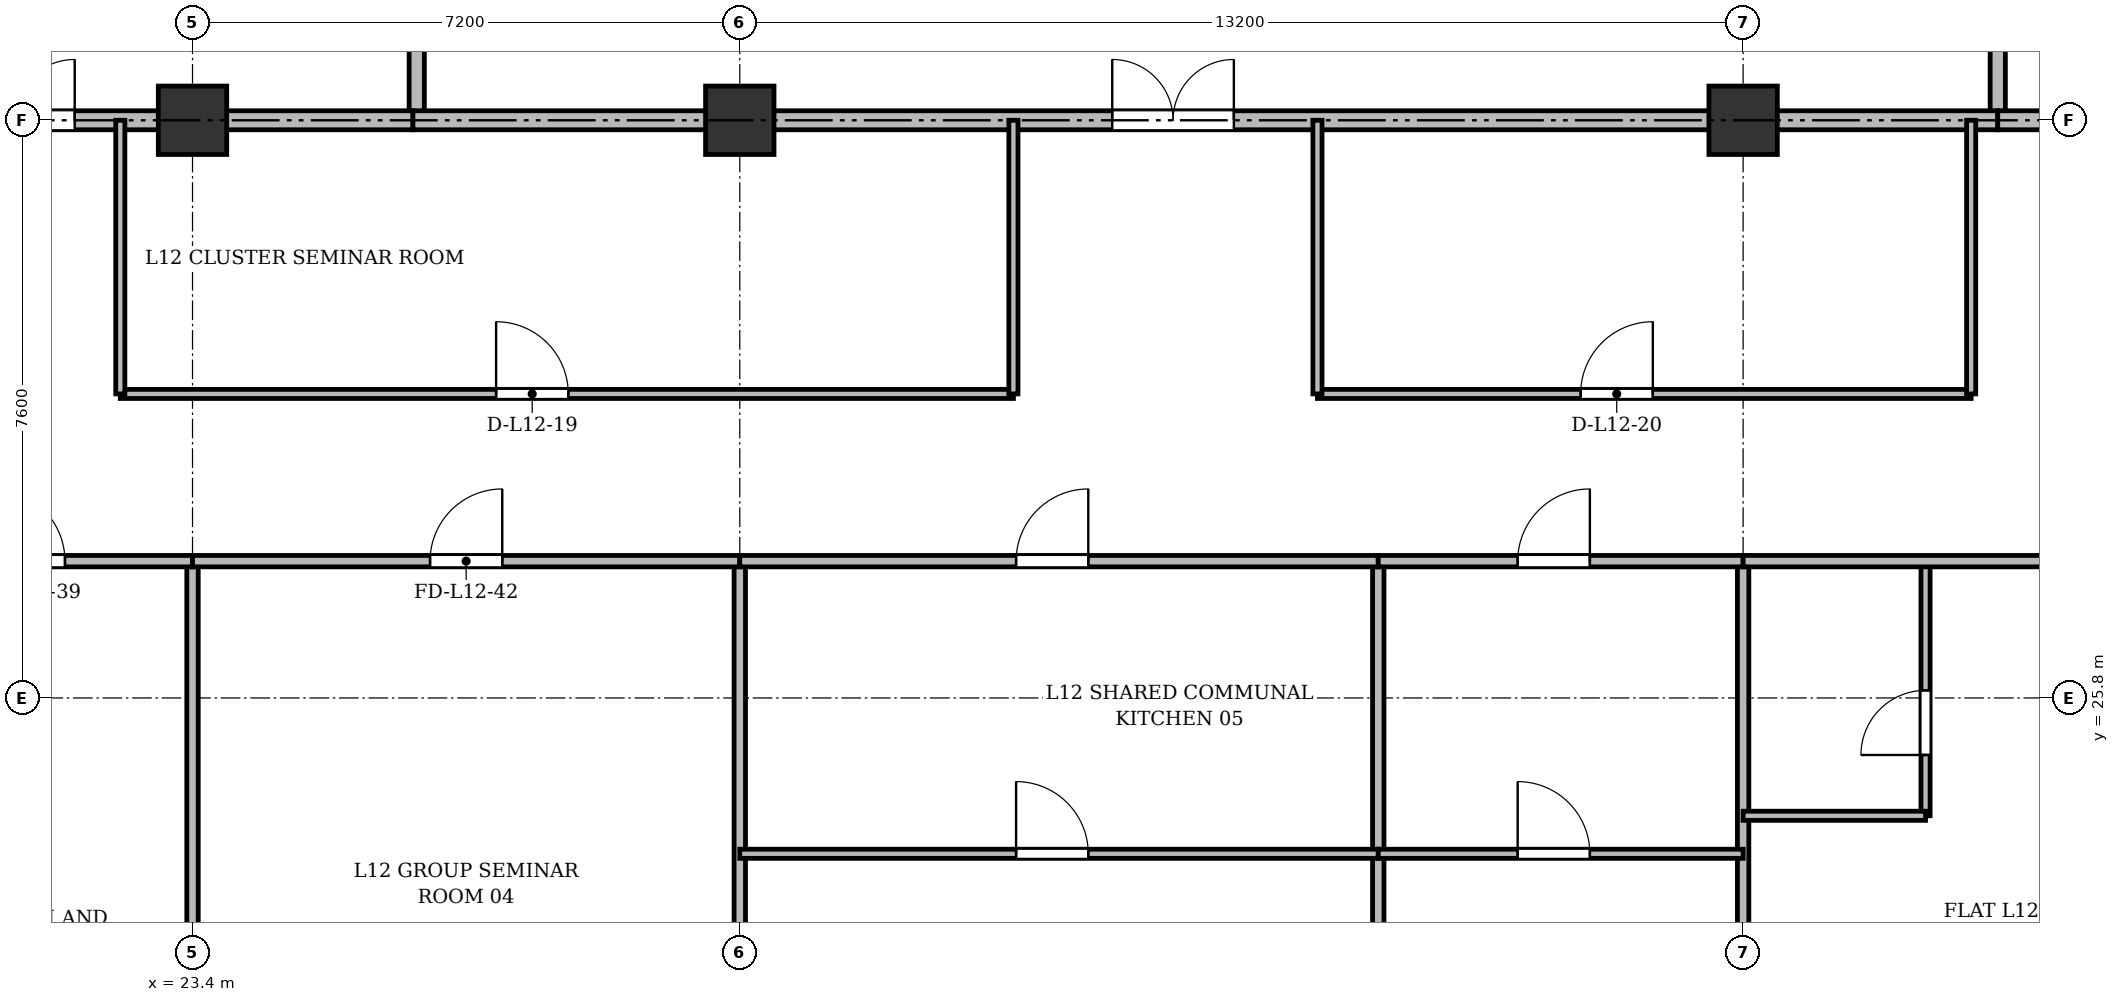
"""IFC4 building model, lengths in metres.
Left out: names, types, materials, properties, quantities, classifications, styles, units other than length and angle.
Written with IfcOpenShell. Run it as: python <this file> out.ifc"""

import sys

from ifc_helpers import new_model, si_unit, direction, frame, frame_2d, origin, origin_2d, place, context, subcontext, project, spatial, rectangle, extrude, source, transform, mapped, element, fill, save


model = new_model("IFC4")
c1 = context("Model", 3, precision=1e-05, world=origin(), true_north=direction((0.0, 1.0)))
c2 = subcontext(c1, "Body", "Model", "MODEL_VIEW")
j1 = project(units=[si_unit("LENGTHUNIT", "METRE"), si_unit("PLANEANGLEUNIT", "RADIAN")], contexts=[c1])
p1 = place(None, origin())
s1 = spatial("IfcSite", under=j1, at=p1, CompositionType="ELEMENT")
p2 = place(p1, origin())
s2 = spatial("IfcBuilding", under=s1, at=p2, CompositionType="ELEMENT")
p3 = place(p2, frame((0.0, 0.0, 48.7)))
s3 = spatial("IfcBuildingStorey", under=s2, at=p3, CompositionType="ELEMENT", Elevation=48.7)
m1 = source(origin(), c2, "Body", "SweptSolid", [
    extrude(rectangle(XDim=0.9, YDim=0.9, at=origin_2d()), origin(), (0.0, 0.0, 1.0), 3.6),
])
for number, where, z_axis, x_axis in (
    (1, (23.4, 33.4, 0.0), (0.0, 0.0, 1.0), (1.0, 0.0, 0.0)),
    (2, (30.6, 33.4, 0.0), (0.0, 0.0, 1.0), (1.0, 0.0, 0.0)),
    (3, (43.8, 33.4, 0.0), (0.0, 0.0, 1.0), (1.0, 0.0, 0.0)),
):
    element("IfcColumn", number, at=place(p3, frame(where, z_axis=z_axis, x_axis=x_axis)), inside=s3, PredefinedType="COLUMN", context=c2, shape_type="MappedRepresentation", body=[
        mapped(m1, transform((0.0, 0.0, 0.0), x_axis=(1.0, 0.0, 0.0), y_axis=(0.0, 1.0, 0.0), z_axis=(0.0, 0.0, 1.0), scale=1.0)),
    ])
p4 = place(p3, frame((26.35, 33.4, 0.0), z_axis=(0.0, 0.0, 1.0), x_axis=(0.0, 1.0, 0.0)))
e4 = element("IfcWall", 4, at=p4, inside=s3, PredefinedType="SOLIDWALL", context=c2, shape_type="SweptSolid", body=[
    extrude(rectangle(XDim=11.3, YDim=0.2, at=frame_2d((5.65, 0.0))), origin(), (0.0, 0.0, 1.0), 2.69),
])
p5 = place(p3, frame((19.5, 33.4, 0.0), z_axis=(0.0, 0.0, 1.0), x_axis=(1.0, 0.0, 0.0)))
e5 = element("IfcWall", 5, at=p5, inside=s3, PredefinedType="PARTITIONING", context=c2, shape_type="SweptSolid", body=[
    extrude(rectangle(XDim=6.8, YDim=0.25, at=frame_2d((3.4, 0.0))), origin(), (0.0, 0.0, 1.0), 2.69),
])
p6 = place(p5, frame((0.75, 0.0, 0.0)))
e6 = element("IfcOpeningElement", 6, at=p6, cuts=e5, PredefinedType="OPENING", context=c2, shape_type="SweptSolid", body=[
    extrude(rectangle(XDim=1.6, YDim=2.2, at=frame_2d((0.8, 1.1))), frame((0.0, 0.135, 0.0), z_axis=(0.0, -1.0, 0.0), x_axis=(1.0, 0.0, 0.0)), (0.0, 0.0, 1.0), 0.27),
])
p7 = place(p3, frame((47.15, 33.4, 0.0), z_axis=(0.0, 0.0, 1.0), x_axis=(0.0, 1.0, 0.0)))
e7 = element("IfcWall", 7, at=p7, inside=s3, PredefinedType="SOLIDWALL", context=c2, shape_type="SweptSolid", body=[
    extrude(rectangle(XDim=11.3, YDim=0.2, at=frame_2d((5.65, 0.0))), origin(), (0.0, 0.0, 1.0), 2.69),
])
p8 = place(p3, frame((26.3, 33.4, 0.0), z_axis=(0.0, 0.0, 1.0), x_axis=(1.0, 0.0, 0.0)))
e8 = element("IfcWall", 8, at=p8, inside=s3, PredefinedType="PARTITIONING", context=c2, shape_type="SweptSolid", body=[
    extrude(rectangle(XDim=20.85, YDim=0.25, at=frame_2d((10.425, 0.0))), origin(), (0.0, 0.0, 1.0), 2.69),
])
p9 = place(p8, frame((9.2, 0.0, 0.0)))
e9 = element("IfcOpeningElement", 9, at=p9, cuts=e8, PredefinedType="OPENING", context=c2, shape_type="SweptSolid", body=[
    extrude(rectangle(XDim=1.6, YDim=2.2, at=frame_2d((0.8, 1.1))), frame((0.0, 0.135, 0.0), z_axis=(0.0, -1.0, 0.0), x_axis=(1.0, 0.0, 0.0)), (0.0, 0.0, 1.0), 0.27),
])
p10 = place(p3, frame((47.15, 33.4, 0.0), z_axis=(0.0, 0.0, 1.0), x_axis=(1.0, 0.0, 0.0)))
e10 = element("IfcWall", 10, at=p10, inside=s3, PredefinedType="PARTITIONING", context=c2, shape_type="SweptSolid", body=[
    extrude(rectangle(XDim=11.15, YDim=0.25, at=frame_2d((5.575, 0.0))), origin(), (0.0, 0.0, 1.0), 2.69),
])
p11 = place(p10, frame((0.7, 0.0, 0.0)))
e11 = element("IfcOpeningElement", 11, at=p11, cuts=e10, PredefinedType="OPENING", context=c2, shape_type="SweptSolid", body=[
    extrude(rectangle(XDim=0.95, YDim=2.15, at=frame_2d((0.475, 1.075))), frame((0.0, 0.135, 0.0), z_axis=(0.0, -1.0, 0.0), x_axis=(1.0, 0.0, 0.0)), (0.0, 0.0, 1.0), 0.27),
])
p12 = place(p10, frame((6.0, 0.0, 0.0)))
e12 = element("IfcOpeningElement", 12, at=p12, cuts=e10, PredefinedType="OPENING", context=c2, shape_type="SweptSolid", body=[
    extrude(rectangle(XDim=1.2, YDim=2.15, at=frame_2d((0.6, 1.075))), frame((0.0, 0.135, 0.0), z_axis=(0.0, -1.0, 0.0), x_axis=(1.0, 0.0, 0.0)), (0.0, 0.0, 1.0), 0.27),
])
p13 = place(p3, frame((22.45, 29.8, 0.0), z_axis=(0.0, 0.0, 1.0), x_axis=(1.0, 0.0, 0.0)))
e13 = element("IfcWall", 13, at=p13, inside=s3, PredefinedType="PARTITIONING", context=c2, shape_type="SweptSolid", body=[
    extrude(rectangle(XDim=11.75, YDim=0.12, at=frame_2d((5.875, 0.0))), origin(), (0.0, 0.0, 1.0), 2.752),
])
p14 = place(p13, frame((4.944, 0.0, 0.0)))
e14 = element("IfcOpeningElement", 14, at=p14, cuts=e13, PredefinedType="OPENING", context=c2, shape_type="SweptSolid", body=[
    extrude(rectangle(XDim=0.95, YDim=2.15, at=frame_2d((0.475, 1.075))), frame((0.0, 0.07, 0.0), z_axis=(0.0, -1.0, 0.0), x_axis=(1.0, 0.0, 0.0)), (0.0, 0.0, 1.0), 0.14),
])
p15 = place(p3, frame((38.2, 29.8, 0.0), z_axis=(0.0, 0.0, 1.0), x_axis=(1.0, 0.0, 0.0)))
e15 = element("IfcWall", 15, at=p15, inside=s3, PredefinedType="PARTITIONING", context=c2, shape_type="SweptSolid", body=[
    extrude(rectangle(XDim=8.6, YDim=0.12, at=frame_2d((4.3, 0.0))), origin(), (0.0, 0.0, 1.0), 2.752),
])
p16 = place(p15, frame((3.462, 0.0, 0.0)))
e16 = element("IfcOpeningElement", 16, at=p16, cuts=e15, PredefinedType="OPENING", context=c2, shape_type="SweptSolid", body=[
    extrude(rectangle(XDim=0.95, YDim=2.15, at=frame_2d((0.475, 1.075))), frame((0.0, 0.07, 0.0), z_axis=(0.0, -1.0, 0.0), x_axis=(1.0, 0.0, 0.0)), (0.0, 0.0, 1.0), 0.14),
])
for number, where, z_axis, x_axis in (
    (17, (22.45, 29.8, 0.0), (0.0, 0.0, 1.0), (0.0, 1.0, 0.0)),
    (18, (34.2, 29.8, 0.0), (0.0, 0.0, 1.0), (0.0, 1.0, 0.0)),
    (19, (38.2, 29.8, 0.0), (0.0, 0.0, 1.0), (0.0, 1.0, 0.0)),
    (20, (46.8, 29.8, 0.0), (0.0, 0.0, 1.0), (0.0, 1.0, 0.0)),
):
    element("IfcWall", number, at=place(p3, frame(where, z_axis=z_axis, x_axis=x_axis)), inside=s3, PredefinedType="PARTITIONING", context=c2, shape_type="SweptSolid", body=[
        extrude(rectangle(XDim=3.6, YDim=0.12, at=frame_2d((1.8, 0.0))), origin(), (0.0, 0.0, 1.0), 2.69),
    ])
for number, where, z_axis, x_axis in (
    (21, (23.4, 3.145, 0.0), (0.0, 0.0, 1.0), (0.0, 1.0, 0.0)),
    (22, (30.6, 3.145, 0.0), (0.0, 0.0, 1.0), (0.0, 1.0, 0.0)),
):
    element("IfcWall", number, at=place(p3, frame(where, z_axis=z_axis, x_axis=x_axis)), inside=s3, PredefinedType="PARTITIONING", context=c2, shape_type="SweptSolid", body=[
        extrude(rectangle(XDim=24.455, YDim=0.15, at=frame_2d((12.228, 0.0))), origin(), (0.0, 0.0, 1.0), 2.752),
    ])
p17 = place(p3, frame((39.0, 3.145, 0.0), z_axis=(0.0, 0.0, 1.0), x_axis=(0.0, 1.0, 0.0)))
e23 = element("IfcWall", 23, at=p17, inside=s3, PredefinedType="PARTITIONING", context=c2, shape_type="SweptSolid", body=[
    extrude(rectangle(XDim=24.455, YDim=0.15, at=frame_2d((12.228, 0.0))), origin(), (0.0, 0.0, 1.0), 2.69),
])
p18 = place(p3, frame((43.8, 3.145, 0.0), z_axis=(0.0, 0.0, 1.0), x_axis=(0.0, 1.0, 0.0)))
e24 = element("IfcWall", 24, at=p18, inside=s3, PredefinedType="PARTITIONING", context=c2, shape_type="SweptSolid", body=[
    extrude(rectangle(XDim=24.455, YDim=0.15, at=frame_2d((12.228, 0.0))), origin(), (0.0, 0.0, 1.0), 2.752),
])
p19 = place(p3, frame((15.6, 27.6, 0.0), z_axis=(0.0, 0.0, 1.0), x_axis=(1.0, 0.0, 0.0)))
e25 = element("IfcWall", 25, at=p19, inside=s3, PredefinedType="PARTITIONING", context=c2, shape_type="SweptSolid", body=[
    extrude(rectangle(XDim=7.8, YDim=0.15, at=frame_2d((3.9, 0.0))), origin(), (0.0, 0.0, 1.0), 2.752),
])
p20 = place(p19, frame((5.172, 0.0, 0.0)))
e26 = element("IfcOpeningElement", 26, at=p20, cuts=e25, PredefinedType="OPENING", context=c2, shape_type="SweptSolid", body=[
    extrude(rectangle(XDim=0.95, YDim=2.15, at=frame_2d((0.475, 1.075))), frame((0.0, 0.085, 0.0), z_axis=(0.0, -1.0, 0.0), x_axis=(1.0, 0.0, 0.0)), (0.0, 0.0, 1.0), 0.17),
])
p21 = place(p3, frame((23.4, 27.6, 0.0), z_axis=(0.0, 0.0, 1.0), x_axis=(1.0, 0.0, 0.0)))
e27 = element("IfcWall", 27, at=p21, inside=s3, PredefinedType="PARTITIONING", context=c2, shape_type="SweptSolid", body=[
    extrude(rectangle(XDim=7.2, YDim=0.15, at=frame_2d((3.6, 0.0))), origin(), (0.0, 0.0, 1.0), 2.752),
])
p22 = place(p21, frame((3.125, 0.0, 0.0)))
e28 = element("IfcOpeningElement", 28, at=p22, cuts=e27, PredefinedType="OPENING", context=c2, shape_type="SweptSolid", body=[
    extrude(rectangle(XDim=0.95, YDim=2.15, at=frame_2d((0.475, 1.075))), frame((0.0, 0.085, 0.0), z_axis=(0.0, -1.0, 0.0), x_axis=(1.0, 0.0, 0.0)), (0.0, 0.0, 1.0), 0.17),
])
p23 = place(p3, frame((30.6, 27.6, 0.0), z_axis=(0.0, 0.0, 1.0), x_axis=(1.0, 0.0, 0.0)))
e29 = element("IfcWall", 29, at=p23, inside=s3, PredefinedType="PARTITIONING", context=c2, shape_type="SweptSolid", body=[
    extrude(rectangle(XDim=8.4, YDim=0.15, at=frame_2d((4.2, 0.0))), origin(), (0.0, 0.0, 1.0), 2.752),
])
p24 = place(p23, frame((3.635, 0.0, 0.0)))
e30 = element("IfcOpeningElement", 30, at=p24, cuts=e29, PredefinedType="OPENING", context=c2, shape_type="SweptSolid", body=[
    extrude(rectangle(XDim=0.95, YDim=2.15, at=frame_2d((0.475, 1.075))), frame((0.0, 0.085, 0.0), z_axis=(0.0, -1.0, 0.0), x_axis=(1.0, 0.0, 0.0)), (0.0, 0.0, 1.0), 0.17),
])
p25 = place(p3, frame((30.6, 23.75, 0.0), z_axis=(0.0, 0.0, 1.0), x_axis=(1.0, 0.0, 0.0)))
e31 = element("IfcWall", 31, at=p25, inside=s3, PredefinedType="PARTITIONING", context=c2, shape_type="SweptSolid", body=[
    extrude(rectangle(XDim=8.4, YDim=0.12, at=frame_2d((4.2, 0.0))), origin(), (0.0, 0.0, 1.0), 2.752),
])
p26 = place(p25, frame((3.635, 0.0, 0.0)))
e32 = element("IfcOpeningElement", 32, at=p26, cuts=e31, PredefinedType="OPENING", context=c2, shape_type="SweptSolid", body=[
    extrude(rectangle(XDim=0.95, YDim=2.15, at=frame_2d((0.475, 1.075))), frame((0.0, 0.07, 0.0), z_axis=(0.0, -1.0, 0.0), x_axis=(1.0, 0.0, 0.0)), (0.0, 0.0, 1.0), 0.14),
])
p27 = place(p3, frame((39.0, 27.6, 0.0), z_axis=(0.0, 0.0, 1.0), x_axis=(1.0, 0.0, 0.0)))
e33 = element("IfcWall", 33, at=p27, inside=s3, PredefinedType="PARTITIONING", context=c2, shape_type="SweptSolid", body=[
    extrude(rectangle(XDim=4.8, YDim=0.15, at=frame_2d((2.4, 0.0))), origin(), (0.0, 0.0, 1.0), 2.752),
])
p28 = place(p27, frame((1.834, 0.0, 0.0)))
e34 = element("IfcOpeningElement", 34, at=p28, cuts=e33, PredefinedType="OPENING", context=c2, shape_type="SweptSolid", body=[
    extrude(rectangle(XDim=0.95, YDim=2.15, at=frame_2d((0.475, 1.075))), frame((0.0, 0.085, 0.0), z_axis=(0.0, -1.0, 0.0), x_axis=(1.0, 0.0, 0.0)), (0.0, 0.0, 1.0), 0.17),
])
p29 = place(p3, frame((39.0, 23.75, 0.0), z_axis=(0.0, 0.0, 1.0), x_axis=(1.0, 0.0, 0.0)))
e35 = element("IfcWall", 35, at=p29, inside=s3, PredefinedType="PARTITIONING", context=c2, shape_type="SweptSolid", body=[
    extrude(rectangle(XDim=4.8, YDim=0.12, at=frame_2d((2.4, 0.0))), origin(), (0.0, 0.0, 1.0), 2.752),
])
p30 = place(p29, frame((1.834, 0.0, 0.0)))
e36 = element("IfcOpeningElement", 36, at=p30, cuts=e35, PredefinedType="OPENING", context=c2, shape_type="SweptSolid", body=[
    extrude(rectangle(XDim=0.95, YDim=2.15, at=frame_2d((0.475, 1.075))), frame((0.0, 0.07, 0.0), z_axis=(0.0, -1.0, 0.0), x_axis=(1.0, 0.0, 0.0)), (0.0, 0.0, 1.0), 0.14),
])
p31 = place(p3, frame((46.2, 24.25, 0.0), z_axis=(0.0, 0.0, 1.0), x_axis=(0.0, 1.0, 0.0)))
e37 = element("IfcWall", 37, at=p31, inside=s3, PredefinedType="PARTITIONING", context=c2, shape_type="SweptSolid", body=[
    extrude(rectangle(XDim=3.35, YDim=0.12, at=frame_2d((1.675, 0.0))), origin(), (0.0, 0.0, 1.0), 2.94),
])
p32 = place(p31, frame((0.8, 0.0, 0.0)))
e38 = element("IfcOpeningElement", 38, at=p32, cuts=e37, PredefinedType="OPENING", context=c2, shape_type="SweptSolid", body=[
    extrude(rectangle(XDim=0.85, YDim=2.1, at=frame_2d((0.425, 1.05))), frame((0.0, 0.07, 0.0), z_axis=(0.0, -1.0, 0.0), x_axis=(1.0, 0.0, 0.0)), (0.0, 0.0, 1.0), 0.14),
])
p33 = place(p3, frame((43.8, 24.25, 0.0), z_axis=(0.0, 0.0, 1.0), x_axis=(1.0, 0.0, 0.0)))
e39 = element("IfcWall", 39, at=p33, inside=s3, PredefinedType="PARTITIONING", context=c2, shape_type="SweptSolid", body=[
    extrude(rectangle(XDim=2.4, YDim=0.12, at=frame_2d((1.2, 0.0))), origin(), (0.0, 0.0, 1.0), 2.752),
])
p34 = place(p3, frame((43.8, 27.6, 0.0), z_axis=(0.0, 0.0, 1.0), x_axis=(1.0, 0.0, 0.0)))
e40 = element("IfcWall", 40, at=p34, inside=s3, PredefinedType="PARTITIONING", context=c2, shape_type="SweptSolid", body=[
    extrude(rectangle(XDim=7.2, YDim=0.15, at=frame_2d((3.6, 0.0))), origin(), (0.0, 0.0, 1.0), 2.752),
])
p35 = place(p34, frame((4.706, 0.0, 0.0)))
e41 = element("IfcOpeningElement", 41, at=p35, cuts=e40, PredefinedType="OPENING", context=c2, shape_type="SweptSolid", body=[
    extrude(rectangle(XDim=0.95, YDim=2.15, at=frame_2d((0.475, 1.075))), frame((0.0, 0.085, 0.0), z_axis=(0.0, -1.0, 0.0), x_axis=(1.0, 0.0, 0.0)), (0.0, 0.0, 1.0), 0.17),
])
m2 = source(origin(), c2, "Body", "SweptSolid", [
    extrude(rectangle(XDim=1.6, YDim=2.2, at=frame_2d((0.8, 1.1))), frame((0.0, 0.025, 0.0), z_axis=(0.0, -1.0, 0.0), x_axis=(1.0, 0.0, 0.0)), (0.0, 0.0, 1.0), 0.05),
])
p36 = place(p6, origin())
e42 = element("IfcDoor", 42, at=p36, inside=s3, OperationType="DOUBLE_DOOR_SINGLE_SWING", PredefinedType="DOOR", context=c2, shape_type="MappedRepresentation", body=[
    mapped(m2, transform((0.0, 0.0, 0.0), x_axis=(1.0, 0.0, 0.0), y_axis=(0.0, 1.0, 0.0), z_axis=(0.0, 0.0, 1.0), scale=1.0)),
])
fill(e6, e42)
p37 = place(p9, origin())
e43 = element("IfcDoor", 43, at=p37, inside=s3, OperationType="DOUBLE_DOOR_SINGLE_SWING", PredefinedType="DOOR", context=c2, shape_type="MappedRepresentation", body=[
    mapped(m2, transform((0.0, 0.0, 0.0), x_axis=(1.0, 0.0, 0.0), y_axis=(0.0, 1.0, 0.0), z_axis=(0.0, 0.0, 1.0), scale=1.0)),
])
fill(e9, e43)
m3 = source(origin(), c2, "Body", "SweptSolid", [
    extrude(rectangle(XDim=0.95, YDim=2.15, at=frame_2d((0.475, 1.075))), frame((0.0, 0.025, 0.0), z_axis=(0.0, -1.0, 0.0), x_axis=(1.0, 0.0, 0.0)), (0.0, 0.0, 1.0), 0.05),
])
p38 = place(p14, origin())
e44 = element("IfcDoor", 44, at=p38, inside=s3, OperationType="SINGLE_SWING_LEFT", PredefinedType="DOOR", context=c2, shape_type="MappedRepresentation", body=[
    mapped(m3, transform((0.0, 0.0, 0.0), x_axis=(1.0, 0.0, 0.0), y_axis=(0.0, 1.0, 0.0), z_axis=(0.0, 0.0, 1.0), scale=1.0)),
])
fill(e14, e44)
p39 = place(p16, origin())
e45 = element("IfcDoor", 45, at=p39, inside=s3, OperationType="SINGLE_SWING_RIGHT", PredefinedType="DOOR", context=c2, shape_type="MappedRepresentation", body=[
    mapped(m3, transform((0.0, 0.0, 0.0), x_axis=(1.0, 0.0, 0.0), y_axis=(0.0, 1.0, 0.0), z_axis=(0.0, 0.0, 1.0), scale=1.0)),
])
fill(e16, e45)
p40 = place(p20, origin())
e46 = element("IfcDoor", 46, at=p40, inside=s3, OperationType="SINGLE_SWING_LEFT", PredefinedType="DOOR", context=c2, shape_type="MappedRepresentation", body=[
    mapped(m3, transform((0.0, 0.0, 0.0), x_axis=(1.0, 0.0, 0.0), y_axis=(0.0, 1.0, 0.0), z_axis=(0.0, 0.0, 1.0), scale=1.0)),
])
fill(e26, e46)
p41 = place(p22, origin())
e47 = element("IfcDoor", 47, at=p41, inside=s3, OperationType="SINGLE_SWING_RIGHT", PredefinedType="DOOR", context=c2, shape_type="MappedRepresentation", body=[
    mapped(m3, transform((0.0, 0.0, 0.0), x_axis=(1.0, 0.0, 0.0), y_axis=(0.0, 1.0, 0.0), z_axis=(0.0, 0.0, 1.0), scale=1.0)),
])
fill(e28, e47)
p42 = place(p24, origin())
e48 = element("IfcDoor", 48, at=p42, inside=s3, OperationType="SINGLE_SWING_RIGHT", PredefinedType="DOOR", context=c2, shape_type="MappedRepresentation", body=[
    mapped(m3, transform((0.0, 0.0, 0.0), x_axis=(1.0, 0.0, 0.0), y_axis=(0.0, 1.0, 0.0), z_axis=(0.0, 0.0, 1.0), scale=1.0)),
])
fill(e30, e48)
p43 = place(p26, origin())
e49 = element("IfcDoor", 49, at=p43, inside=s3, OperationType="SINGLE_SWING_LEFT", PredefinedType="DOOR", context=c2, shape_type="MappedRepresentation", body=[
    mapped(m3, transform((0.0, 0.0, 0.0), x_axis=(1.0, 0.0, 0.0), y_axis=(0.0, 1.0, 0.0), z_axis=(0.0, 0.0, 1.0), scale=1.0)),
])
fill(e32, e49)
p44 = place(p28, origin())
e50 = element("IfcDoor", 50, at=p44, inside=s3, OperationType="SINGLE_SWING_RIGHT", PredefinedType="DOOR", context=c2, shape_type="MappedRepresentation", body=[
    mapped(m3, transform((0.0, 0.0, 0.0), x_axis=(1.0, 0.0, 0.0), y_axis=(0.0, 1.0, 0.0), z_axis=(0.0, 0.0, 1.0), scale=1.0)),
])
fill(e34, e50)
p45 = place(p30, origin())
e51 = element("IfcDoor", 51, at=p45, inside=s3, OperationType="SINGLE_SWING_LEFT", PredefinedType="DOOR", context=c2, shape_type="MappedRepresentation", body=[
    mapped(m3, transform((0.0, 0.0, 0.0), x_axis=(1.0, 0.0, 0.0), y_axis=(0.0, 1.0, 0.0), z_axis=(0.0, 0.0, 1.0), scale=1.0)),
])
fill(e36, e51)
m4 = source(origin(), c2, "Body", "SweptSolid", [
    extrude(rectangle(XDim=0.85, YDim=2.1, at=frame_2d((0.425, 1.05))), frame((0.0, 0.025, 0.0), z_axis=(0.0, -1.0, 0.0), x_axis=(1.0, 0.0, 0.0)), (0.0, 0.0, 1.0), 0.05),
])
p46 = place(p32, origin())
e52 = element("IfcDoor", 52, at=p46, inside=s3, OperationType="SINGLE_SWING_LEFT", PredefinedType="DOOR", context=c2, shape_type="MappedRepresentation", body=[
    mapped(m4, transform((0.0, 0.0, 0.0), x_axis=(1.0, 0.0, 0.0), y_axis=(0.0, 1.0, 0.0), z_axis=(0.0, 0.0, 1.0), scale=1.0)),
])
fill(e38, e52)
save(model, sys.argv[1])
